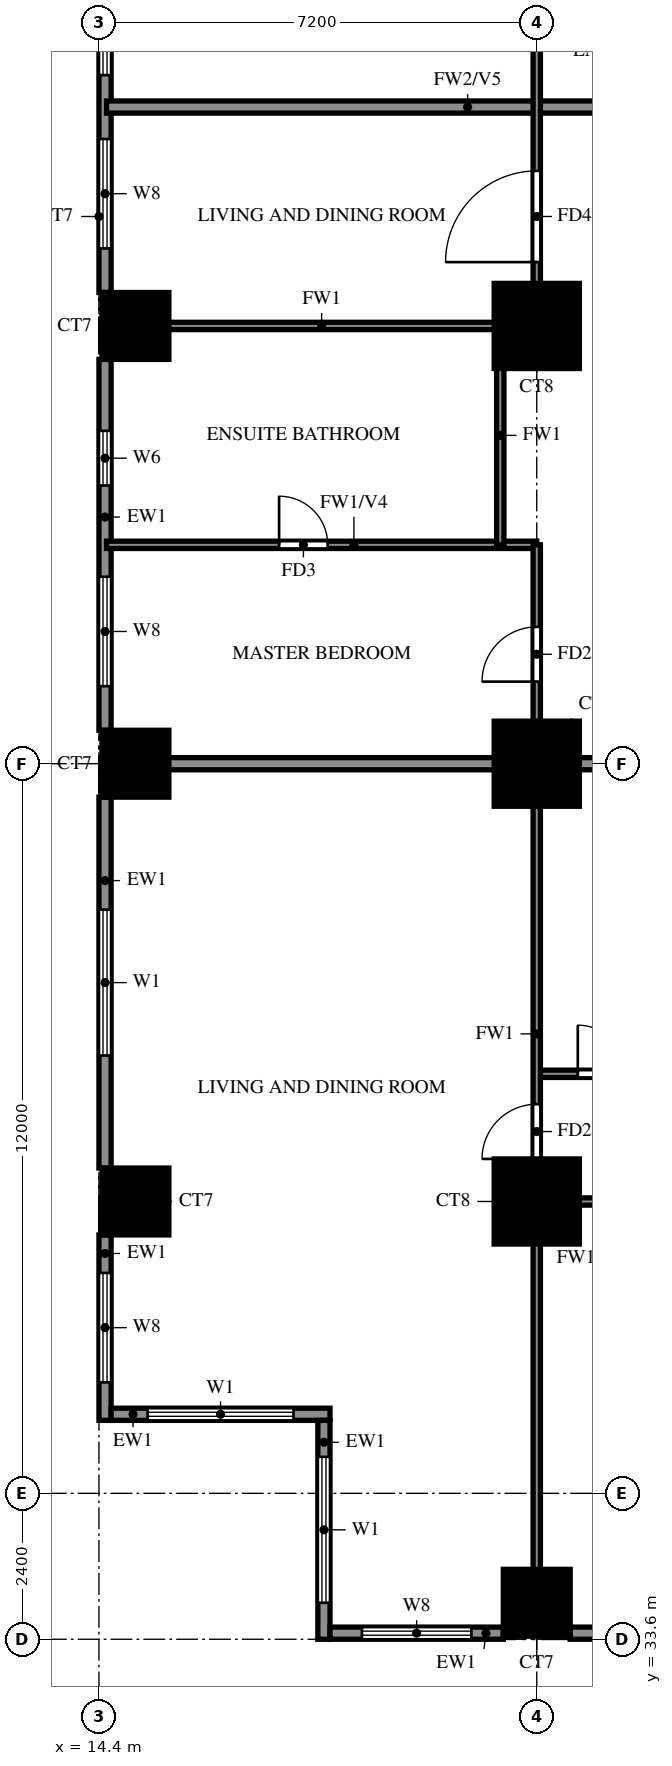
"""IFC4 building model, lengths in metres.
Left out: names, types, materials, properties, quantities, classifications, styles, units other than length and angle.
Written with IfcOpenShell. Run it as: python <this file> out.ifc"""

import sys

from ifc_helpers import new_model, si_unit, direction, frame, frame_2d, origin, origin_2d, place, context, subcontext, project, spatial, rectangle, extrude, source, transform, mapped, element, fill, save


model = new_model("IFC4")
c1 = context("Model", 3, precision=1e-05, world=origin(), true_north=direction((0.0, 1.0)))
c2 = subcontext(c1, "Body", "Model", "MODEL_VIEW")
j1 = project(units=[si_unit("LENGTHUNIT", "METRE"), si_unit("PLANEANGLEUNIT", "RADIAN")], contexts=[c1])
p1 = place(None, origin())
s1 = spatial("IfcSite", under=j1, at=p1, CompositionType="ELEMENT")
p2 = place(p1, origin())
s2 = spatial("IfcBuilding", under=s1, at=p2, CompositionType="ELEMENT")
p3 = place(p2, frame((0.0, 0.0, 55.0)))
s3 = spatial("IfcBuildingStorey", under=s2, at=p3, CompositionType="ELEMENT", Elevation=55.0)
m1 = source(origin(), c2, "Body", "SweptSolid", [
    extrude(rectangle(XDim=1.1, YDim=1.1, at=origin_2d()), origin(), (0.0, 0.0, 1.0), 3.18),
])
for number, where, z_axis, x_axis in (
    (1, (21.6, 34.2, 0.0), (0.0, 0.0, 1.0), (1.0, 0.0, 0.0)),
    (2, (15.0, 40.8, 0.0), (0.0, 0.0, 1.0), (1.0, 0.0, 0.0)),
):
    element("IfcColumn", number, at=place(p3, frame(where, z_axis=z_axis, x_axis=x_axis)), inside=s3, PredefinedType="COLUMN", context=c2, shape_type="MappedRepresentation", body=[
        mapped(m1, transform((0.0, 0.0, 0.0))),
    ])
m2 = source(origin(), c2, "Body", "SweptSolid", [
    extrude(rectangle(XDim=1.4, YDim=1.4, at=origin_2d()), origin(), (0.0, 0.0, 1.0), 3.18),
])
p4 = place(p3, frame((21.6, 40.8, 0.0), z_axis=(0.0, 0.0, 1.0), x_axis=(1.0, 0.0, 0.0)))
e3 = element("IfcColumn", 3, at=p4, inside=s3, PredefinedType="COLUMN", context=c2, shape_type="MappedRepresentation", body=[
    mapped(m2, transform((0.0, 0.0, 0.0))),
])
p5 = place(p3, frame((15.0, 48.0, 0.0), z_axis=(0.0, 0.0, 1.0), x_axis=(1.0, 0.0, 0.0)))
e4 = element("IfcColumn", 4, at=p5, inside=s3, PredefinedType="COLUMN", context=c2, shape_type="MappedRepresentation", body=[
    mapped(m1, transform((0.0, 0.0, 0.0))),
])
p6 = place(p3, frame((21.6, 48.0, 0.0), z_axis=(0.0, 0.0, 1.0), x_axis=(1.0, 0.0, 0.0)))
e5 = element("IfcColumn", 5, at=p6, inside=s3, PredefinedType="COLUMN", context=c2, shape_type="MappedRepresentation", body=[
    mapped(m2, transform((0.0, 0.0, 0.0))),
])
p7 = place(p3, frame((15.0, 55.2, 0.0), z_axis=(0.0, 0.0, 1.0), x_axis=(1.0, 0.0, 0.0)))
e6 = element("IfcColumn", 6, at=p7, inside=s3, PredefinedType="COLUMN", context=c2, shape_type="MappedRepresentation", body=[
    mapped(m1, transform((0.0, 0.0, 0.0))),
])
p8 = place(p3, frame((21.6, 55.2, 0.0), z_axis=(0.0, 0.0, 1.0), x_axis=(1.0, 0.0, 0.0)))
e7 = element("IfcColumn", 7, at=p8, inside=s3, PredefinedType="COLUMN", context=c2, shape_type="MappedRepresentation", body=[
    mapped(m2, transform((0.0, 0.0, 0.0))),
])
p9 = place(p3, frame((14.5, 61.85, 0.0), z_axis=(0.0, 0.0, 1.0), x_axis=(0.0, -1.0, 0.0)))
e8 = element("IfcWall", 8, at=p9, inside=s3, PredefinedType="SOLIDWALL", context=c2, shape_type="SweptSolid", body=[
    extrude(rectangle(XDim=6.1, YDim=0.2, at=frame_2d((3.05, 0.0))), origin(), (0.0, 0.0, 1.0), 3.18),
])
p10 = place(p9, frame((3.575, 0.0, 0.6)))
e9 = element("IfcOpeningElement", 9, at=p10, cuts=e8, PredefinedType="OPENING", context=c2, shape_type="SweptSolid", body=[
    extrude(rectangle(XDim=1.8, YDim=2.4, at=frame_2d((0.9, 1.2))), frame((0.0, 0.11, 0.0), z_axis=(0.0, -1.0, 0.0), x_axis=(1.0, 0.0, 0.0)), (0.0, 0.0, 1.0), 0.22),
])
p11 = place(p9, frame((0.725, 0.0, 0.6)))
e10 = element("IfcOpeningElement", 10, at=p11, cuts=e8, PredefinedType="OPENING", context=c2, shape_type="SweptSolid", body=[
    extrude(rectangle(XDim=1.8, YDim=2.4, at=frame_2d((0.9, 1.2))), frame((0.0, 0.11, 0.0), z_axis=(0.0, -1.0, 0.0), x_axis=(1.0, 0.0, 0.0)), (0.0, 0.0, 1.0), 0.22),
])
p12 = place(p3, frame((14.5, 54.65, 0.0), z_axis=(0.0, 0.0, 1.0), x_axis=(0.0, -1.0, 0.0)))
e11 = element("IfcWall", 11, at=p12, inside=s3, PredefinedType="SOLIDWALL", context=c2, shape_type="SweptSolid", body=[
    extrude(rectangle(XDim=6.1, YDim=0.2, at=frame_2d((3.05, 0.0))), origin(), (0.0, 0.0, 1.0), 3.18),
])
p13 = place(p12, frame((3.575, 0.0, 0.6)))
e12 = element("IfcOpeningElement", 12, at=p13, cuts=e11, PredefinedType="OPENING", context=c2, shape_type="SweptSolid", body=[
    extrude(rectangle(XDim=1.8, YDim=2.4, at=frame_2d((0.9, 1.2))), frame((0.0, 0.11, 0.0), z_axis=(0.0, -1.0, 0.0), x_axis=(1.0, 0.0, 0.0)), (0.0, 0.0, 1.0), 0.22),
])
p14 = place(p12, frame((1.175, 0.0, 1.5)))
e13 = element("IfcOpeningElement", 13, at=p14, cuts=e11, PredefinedType="OPENING", context=c2, shape_type="SweptSolid", body=[
    extrude(rectangle(XDim=0.9, YDim=0.9, at=frame_2d((0.45, 0.45))), frame((0.0, 0.11, 0.0), z_axis=(0.0, -1.0, 0.0), x_axis=(1.0, 0.0, 0.0)), (0.0, 0.0, 1.0), 0.22),
])
p15 = place(p3, frame((14.5, 47.45, 0.0), z_axis=(0.0, 0.0, 1.0), x_axis=(0.0, -1.0, 0.0)))
e14 = element("IfcWall", 14, at=p15, inside=s3, PredefinedType="SOLIDWALL", context=c2, shape_type="SweptSolid", body=[
    extrude(rectangle(XDim=6.1, YDim=0.2, at=frame_2d((3.05, 0.0))), origin(), (0.0, 0.0, 1.0), 3.18),
])
p16 = place(p15, frame((1.85, 0.0, 0.6)))
e15 = element("IfcOpeningElement", 15, at=p16, cuts=e14, PredefinedType="OPENING", context=c2, shape_type="SweptSolid", body=[
    extrude(rectangle(XDim=2.4, YDim=2.4, at=frame_2d((1.2, 1.2))), frame((0.0, 0.11, 0.0), z_axis=(0.0, -1.0, 0.0), x_axis=(1.0, 0.0, 0.0)), (0.0, 0.0, 1.0), 0.22),
])
p17 = place(p3, frame((14.5, 40.25, 0.0), z_axis=(0.0, 0.0, 1.0), x_axis=(0.0, -1.0, 0.0)))
e16 = element("IfcWall", 16, at=p17, inside=s3, PredefinedType="SOLIDWALL", context=c2, shape_type="SweptSolid", body=[
    extrude(rectangle(XDim=3.05, YDim=0.2, at=frame_2d((1.525, 0.0))), origin(), (0.0, 0.0, 1.0), 3.18),
])
p18 = place(p17, frame((0.625, 0.0, 0.6)))
e17 = element("IfcOpeningElement", 17, at=p18, cuts=e16, PredefinedType="OPENING", context=c2, shape_type="SweptSolid", body=[
    extrude(rectangle(XDim=1.8, YDim=2.4, at=frame_2d((0.9, 1.2))), frame((0.0, 0.11, 0.0), z_axis=(0.0, -1.0, 0.0), x_axis=(1.0, 0.0, 0.0)), (0.0, 0.0, 1.0), 0.22),
])
p19 = place(p3, frame((14.6, 37.3, 0.0), z_axis=(0.0, 0.0, 1.0), x_axis=(1.0, 0.0, 0.0)))
e18 = element("IfcWall", 18, at=p19, inside=s3, PredefinedType="SOLIDWALL", context=c2, shape_type="SweptSolid", body=[
    extrude(rectangle(XDim=3.6, YDim=0.2, at=frame_2d((1.8, 0.0))), origin(), (0.0, 0.0, 1.0), 3.18),
])
p20 = place(p19, frame((0.6, 0.0, 0.6)))
e19 = element("IfcOpeningElement", 19, at=p20, cuts=e18, PredefinedType="OPENING", context=c2, shape_type="SweptSolid", body=[
    extrude(rectangle(XDim=2.4, YDim=2.4, at=frame_2d((1.2, 1.2))), frame((0.0, 0.11, 0.0), z_axis=(0.0, -1.0, 0.0), x_axis=(1.0, 0.0, 0.0)), (0.0, 0.0, 1.0), 0.22),
])
p21 = place(p3, frame((18.1, 37.2, 0.0), z_axis=(0.0, 0.0, 1.0), x_axis=(0.0, -1.0, 0.0)))
e20 = element("IfcWall", 20, at=p21, inside=s3, PredefinedType="SOLIDWALL", context=c2, shape_type="SweptSolid", body=[
    extrude(rectangle(XDim=3.6, YDim=0.2, at=frame_2d((1.8, 0.0))), origin(), (0.0, 0.0, 1.0), 3.18),
])
p22 = place(p21, frame((0.6, 0.0, 0.6)))
e21 = element("IfcOpeningElement", 21, at=p22, cuts=e20, PredefinedType="OPENING", context=c2, shape_type="SweptSolid", body=[
    extrude(rectangle(XDim=2.4, YDim=2.4, at=frame_2d((1.2, 1.2))), frame((0.0, 0.11, 0.0), z_axis=(0.0, -1.0, 0.0), x_axis=(1.0, 0.0, 0.0)), (0.0, 0.0, 1.0), 0.22),
])
p23 = place(p3, frame((18.2, 33.7, 0.0), z_axis=(0.0, 0.0, 1.0), x_axis=(1.0, 0.0, 0.0)))
e22 = element("IfcWall", 22, at=p23, inside=s3, PredefinedType="SOLIDWALL", context=c2, shape_type="SweptSolid", body=[
    extrude(rectangle(XDim=2.85, YDim=0.2, at=frame_2d((1.425, 0.0))), origin(), (0.0, 0.0, 1.0), 3.18),
])
p24 = place(p23, frame((0.525, 0.0, 0.6)))
e23 = element("IfcOpeningElement", 23, at=p24, cuts=e22, PredefinedType="OPENING", context=c2, shape_type="SweptSolid", body=[
    extrude(rectangle(XDim=1.8, YDim=2.4, at=frame_2d((0.9, 1.2))), frame((0.0, 0.11, 0.0), z_axis=(0.0, -1.0, 0.0), x_axis=(1.0, 0.0, 0.0)), (0.0, 0.0, 1.0), 0.22),
])
p25 = place(p3, frame((22.15, 33.7, 0.0), z_axis=(0.0, 0.0, 1.0), x_axis=(1.0, 0.0, 0.0)))
e24 = element("IfcWall", 24, at=p25, inside=s3, PredefinedType="SOLIDWALL", context=c2, shape_type="SweptSolid", body=[
    extrude(rectangle(XDim=6.1, YDim=0.2, at=frame_2d((3.05, 0.0))), origin(), (0.0, 0.0, 1.0), 3.18),
])
p26 = place(p25, frame((0.725, 0.0, 0.6)))
e25 = element("IfcOpeningElement", 25, at=p26, cuts=e24, PredefinedType="OPENING", context=c2, shape_type="SweptSolid", body=[
    extrude(rectangle(XDim=1.8, YDim=2.4, at=frame_2d((0.9, 1.2))), frame((0.0, 0.11, 0.0), z_axis=(0.0, -1.0, 0.0), x_axis=(1.0, 0.0, 0.0)), (0.0, 0.0, 1.0), 0.22),
])
p27 = place(p25, frame((4.025, 0.0, 1.5)))
e26 = element("IfcOpeningElement", 26, at=p27, cuts=e24, PredefinedType="OPENING", context=c2, shape_type="SweptSolid", body=[
    extrude(rectangle(XDim=0.9, YDim=0.9, at=frame_2d((0.45, 0.45))), frame((0.0, 0.11, 0.0), z_axis=(0.0, -1.0, 0.0), x_axis=(1.0, 0.0, 0.0)), (0.0, 0.0, 1.0), 0.22),
])
p28 = place(p3, frame((14.525, 48.0, 0.0), z_axis=(0.0, 0.0, 1.0), x_axis=(1.0, 0.0, 0.0)))
e27 = element("IfcWall", 27, at=p28, inside=s3, PredefinedType="SOLIDWALL", context=c2, shape_type="SweptSolid", body=[
    extrude(rectangle(XDim=19.075, YDim=0.2, at=frame_2d((9.538, 0.0))), origin(), (0.0, 0.0, 1.0), 3.18),
])
p29 = place(p3, frame((14.525, 58.8, 0.0), z_axis=(0.0, 0.0, 1.0), x_axis=(1.0, 0.0, 0.0)))
e28 = element("IfcWall", 28, at=p29, inside=s3, PredefinedType="SOLIDWALL", context=c2, shape_type="SweptSolid", body=[
    extrude(rectangle(XDim=11.875, YDim=0.2, at=frame_2d((5.938, 0.0))), origin(), (0.0, 0.0, 1.0), 2.28),
])
p30 = place(p3, frame((21.6, 40.8, 0.0), z_axis=(0.0, 0.0, 1.0), x_axis=(1.0, 0.0, 0.0)))
e29 = element("IfcWall", 29, at=p30, inside=s3, PredefinedType="PARTITIONING", context=c2, shape_type="SweptSolid", body=[
    extrude(rectangle(XDim=3.6, YDim=0.12, at=frame_2d((1.8, 0.0))), origin(), (0.0, 0.0, 1.0), 3.18),
])
p31 = place(p30, frame((1.35, 0.0, 0.0)))
e30 = element("IfcOpeningElement", 30, at=p31, cuts=e29, PredefinedType="OPENING", context=c2, shape_type="SweptSolid", body=[
    extrude(rectangle(XDim=0.9, YDim=2.1, at=frame_2d((0.45, 1.05))), frame((0.0, 0.07, 0.0), z_axis=(0.0, -1.0, 0.0), x_axis=(1.0, 0.0, 0.0)), (0.0, 0.0, 1.0), 0.14),
])
p32 = place(p3, frame((21.6, 42.9, 0.0), z_axis=(0.0, 0.0, 1.0), x_axis=(1.0, 0.0, 0.0)))
e31 = element("IfcWall", 31, at=p32, inside=s3, PredefinedType="PARTITIONING", context=c2, shape_type="SweptSolid", body=[
    extrude(rectangle(XDim=12.0, YDim=0.12, at=frame_2d((6.0, 0.0))), origin(), (0.0, 0.0, 1.0), 3.18),
])
p33 = place(p32, frame((0.675, 0.0, 0.0)))
e32 = element("IfcOpeningElement", 32, at=p33, cuts=e31, PredefinedType="OPENING", context=c2, shape_type="SweptSolid", body=[
    extrude(rectangle(XDim=0.8, YDim=2.1, at=frame_2d((0.4, 1.05))), frame((0.0, 0.07, 0.0), z_axis=(0.0, -1.0, 0.0), x_axis=(1.0, 0.0, 0.0)), (0.0, 0.0, 1.0), 0.14),
])
p34 = place(p32, frame((4.0, 0.0, 0.0)))
e33 = element("IfcOpeningElement", 33, at=p34, cuts=e31, PredefinedType="OPENING", context=c2, shape_type="SweptSolid", body=[
    extrude(rectangle(XDim=0.9, YDim=2.1, at=frame_2d((0.45, 1.05))), frame((0.0, 0.07, 0.0), z_axis=(0.0, -1.0, 0.0), x_axis=(1.0, 0.0, 0.0)), (0.0, 0.0, 1.0), 0.14),
])
p35 = place(p32, frame((7.475, 0.0, 0.0)))
e34 = element("IfcOpeningElement", 34, at=p35, cuts=e31, PredefinedType="OPENING", context=c2, shape_type="SweptSolid", body=[
    extrude(rectangle(XDim=0.9, YDim=2.1, at=frame_2d((0.45, 1.05))), frame((0.0, 0.07, 0.0), z_axis=(0.0, -1.0, 0.0), x_axis=(1.0, 0.0, 0.0)), (0.0, 0.0, 1.0), 0.14),
])
p36 = place(p32, frame((10.1, 0.0, 0.0)))
e35 = element("IfcOpeningElement", 35, at=p36, cuts=e31, PredefinedType="OPENING", context=c2, shape_type="SweptSolid", body=[
    extrude(rectangle(XDim=0.9, YDim=2.1, at=frame_2d((0.45, 1.05))), frame((0.0, 0.07, 0.0), z_axis=(0.0, -1.0, 0.0), x_axis=(1.0, 0.0, 0.0)), (0.0, 0.0, 1.0), 0.14),
])
p37 = place(p3, frame((14.525, 51.6, 0.0), z_axis=(0.0, 0.0, 1.0), x_axis=(1.0, 0.0, 0.0)))
e36 = element("IfcWall", 36, at=p37, inside=s3, PredefinedType="PARTITIONING", context=c2, shape_type="SweptSolid", body=[
    extrude(rectangle(XDim=7.075, YDim=0.12, at=frame_2d((3.538, 0.0))), origin(), (0.0, 0.0, 1.0), 2.28),
])
p38 = place(p37, frame((2.837, 0.0, 0.0)))
e37 = element("IfcOpeningElement", 37, at=p38, cuts=e36, PredefinedType="OPENING", context=c2, shape_type="SweptSolid", body=[
    extrude(rectangle(XDim=0.8, YDim=2.1, at=frame_2d((0.4, 1.05))), frame((0.0, 0.07, 0.0), z_axis=(0.0, -1.0, 0.0), x_axis=(1.0, 0.0, 0.0)), (0.0, 0.0, 1.0), 0.14),
])
p39 = place(p3, frame((14.525, 55.2, 0.0), z_axis=(0.0, 0.0, 1.0), x_axis=(1.0, 0.0, 0.0)))
e38 = element("IfcWall", 38, at=p39, inside=s3, PredefinedType="PARTITIONING", context=c2, shape_type="SweptSolid", body=[
    extrude(rectangle(XDim=7.075, YDim=0.12, at=frame_2d((3.538, 0.0))), origin(), (0.0, 0.0, 1.0), 3.18),
])
p40 = place(p3, frame((21.0, 51.6, 0.0), z_axis=(0.0, 0.0, 1.0), x_axis=(0.0, 1.0, 0.0)))
e39 = element("IfcWall", 39, at=p40, inside=s3, PredefinedType="PARTITIONING", context=c2, shape_type="SweptSolid", body=[
    extrude(rectangle(XDim=3.6, YDim=0.12, at=frame_2d((1.8, 0.0))), origin(), (0.0, 0.0, 1.0), 3.18),
])
p41 = place(p3, frame((21.6, 33.725, 0.0), z_axis=(0.0, 0.0, 1.0), x_axis=(0.0, 1.0, 0.0)))
e40 = element("IfcWall", 40, at=p41, inside=s3, PredefinedType="PARTITIONING", context=c2, shape_type="SweptSolid", body=[
    extrude(rectangle(XDim=17.875, YDim=0.12, at=frame_2d((8.938, 0.0))), origin(), (0.0, 0.0, 1.0), 3.18),
])
p42 = place(p41, frame((7.775, 0.0, 0.0)))
e41 = element("IfcOpeningElement", 41, at=p42, cuts=e40, PredefinedType="OPENING", context=c2, shape_type="SweptSolid", body=[
    extrude(rectangle(XDim=0.9, YDim=2.1, at=frame_2d((0.45, 1.05))), frame((0.0, 0.07, 0.0), z_axis=(0.0, -1.0, 0.0), x_axis=(1.0, 0.0, 0.0)), (0.0, 0.0, 1.0), 0.14),
])
p43 = place(p41, frame((15.625, 0.0, 0.0)))
e42 = element("IfcOpeningElement", 42, at=p43, cuts=e40, PredefinedType="OPENING", context=c2, shape_type="SweptSolid", body=[
    extrude(rectangle(XDim=0.9, YDim=2.1, at=frame_2d((0.45, 1.05))), frame((0.0, 0.07, 0.0), z_axis=(0.0, -1.0, 0.0), x_axis=(1.0, 0.0, 0.0)), (0.0, 0.0, 1.0), 0.14),
])
p44 = place(p3, frame((21.6, 55.2, 0.0), z_axis=(0.0, 0.0, 1.0), x_axis=(0.0, 1.0, 0.0)))
e43 = element("IfcWall", 43, at=p44, inside=s3, PredefinedType="PARTITIONING", context=c2, shape_type="SweptSolid", body=[
    extrude(rectangle(XDim=14.4, YDim=0.12, at=frame_2d((7.2, 0.0))), origin(), (0.0, 0.0, 1.0), 3.18),
])
p45 = place(p44, frame((1.05, 0.0, 0.0)))
e44 = element("IfcOpeningElement", 44, at=p45, cuts=e43, PredefinedType="OPENING", context=c2, shape_type="SweptSolid", body=[
    extrude(rectangle(XDim=1.5, YDim=2.1, at=frame_2d((0.75, 1.05))), frame((0.0, 0.07, 0.0), z_axis=(0.0, -1.0, 0.0), x_axis=(1.0, 0.0, 0.0)), (0.0, 0.0, 1.0), 0.14),
])
p46 = place(p44, frame((4.95, 0.0, 0.0)))
e45 = element("IfcOpeningElement", 45, at=p46, cuts=e43, PredefinedType="OPENING", context=c2, shape_type="SweptSolid", body=[
    extrude(rectangle(XDim=0.9, YDim=2.1, at=frame_2d((0.45, 1.05))), frame((0.0, 0.07, 0.0), z_axis=(0.0, -1.0, 0.0), x_axis=(1.0, 0.0, 0.0)), (0.0, 0.0, 1.0), 0.14),
])
p47 = place(p44, frame((10.35, 0.0, 0.0)))
e46 = element("IfcOpeningElement", 46, at=p47, cuts=e43, PredefinedType="OPENING", context=c2, shape_type="SweptSolid", body=[
    extrude(rectangle(XDim=0.9, YDim=2.1, at=frame_2d((0.45, 1.05))), frame((0.0, 0.07, 0.0), z_axis=(0.0, -1.0, 0.0), x_axis=(1.0, 0.0, 0.0)), (0.0, 0.0, 1.0), 0.14),
])
p48 = place(p10, origin())
e47 = element("IfcWindow", 47, at=p48, inside=s3, PartitioningType="DOUBLE_PANEL_VERTICAL", PredefinedType="WINDOW", context=c2, shape_type="SweptSolid", body=[
    extrude(rectangle(XDim=1.8, YDim=2.4, at=frame_2d((0.9, 1.2))), frame((0.0, 0.03, 0.0), z_axis=(0.0, -1.0, 0.0), x_axis=(1.0, 0.0, 0.0)), (0.0, 0.0, 1.0), 0.06),
])
fill(e9, e47)
p49 = place(p11, origin())
e48 = element("IfcWindow", 48, at=p49, inside=s3, PartitioningType="DOUBLE_PANEL_VERTICAL", PredefinedType="WINDOW", context=c2, shape_type="SweptSolid", body=[
    extrude(rectangle(XDim=1.8, YDim=2.4, at=frame_2d((0.9, 1.2))), frame((0.0, 0.03, 0.0), z_axis=(0.0, -1.0, 0.0), x_axis=(1.0, 0.0, 0.0)), (0.0, 0.0, 1.0), 0.06),
])
fill(e10, e48)
p50 = place(p13, origin())
e49 = element("IfcWindow", 49, at=p50, inside=s3, PartitioningType="DOUBLE_PANEL_VERTICAL", PredefinedType="WINDOW", context=c2, shape_type="SweptSolid", body=[
    extrude(rectangle(XDim=1.8, YDim=2.4, at=frame_2d((0.9, 1.2))), frame((0.0, 0.03, 0.0), z_axis=(0.0, -1.0, 0.0), x_axis=(1.0, 0.0, 0.0)), (0.0, 0.0, 1.0), 0.06),
])
fill(e12, e49)
p51 = place(p14, origin())
e50 = element("IfcWindow", 50, at=p51, inside=s3, PartitioningType="SINGLE_PANEL", PredefinedType="WINDOW", context=c2, shape_type="SweptSolid", body=[
    extrude(rectangle(XDim=0.9, YDim=0.9, at=frame_2d((0.45, 0.45))), frame((0.0, 0.03, 0.0), z_axis=(0.0, -1.0, 0.0), x_axis=(1.0, 0.0, 0.0)), (0.0, 0.0, 1.0), 0.06),
])
fill(e13, e50)
p52 = place(p16, origin())
e51 = element("IfcWindow", 51, at=p52, inside=s3, PartitioningType="DOUBLE_PANEL_VERTICAL", PredefinedType="WINDOW", context=c2, shape_type="SweptSolid", body=[
    extrude(rectangle(XDim=2.4, YDim=2.4, at=frame_2d((1.2, 1.2))), frame((0.0, 0.03, 0.0), z_axis=(0.0, -1.0, 0.0), x_axis=(1.0, 0.0, 0.0)), (0.0, 0.0, 1.0), 0.06),
])
fill(e15, e51)
p53 = place(p18, origin())
e52 = element("IfcWindow", 52, at=p53, inside=s3, PartitioningType="DOUBLE_PANEL_VERTICAL", PredefinedType="WINDOW", context=c2, shape_type="SweptSolid", body=[
    extrude(rectangle(XDim=1.8, YDim=2.4, at=frame_2d((0.9, 1.2))), frame((0.0, 0.03, 0.0), z_axis=(0.0, -1.0, 0.0), x_axis=(1.0, 0.0, 0.0)), (0.0, 0.0, 1.0), 0.06),
])
fill(e17, e52)
p54 = place(p20, origin())
e53 = element("IfcWindow", 53, at=p54, inside=s3, PartitioningType="DOUBLE_PANEL_VERTICAL", PredefinedType="WINDOW", context=c2, shape_type="SweptSolid", body=[
    extrude(rectangle(XDim=2.4, YDim=2.4, at=frame_2d((1.2, 1.2))), frame((0.0, 0.03, 0.0), z_axis=(0.0, -1.0, 0.0), x_axis=(1.0, 0.0, 0.0)), (0.0, 0.0, 1.0), 0.06),
])
fill(e19, e53)
p55 = place(p22, origin())
e54 = element("IfcWindow", 54, at=p55, inside=s3, PartitioningType="DOUBLE_PANEL_VERTICAL", PredefinedType="WINDOW", context=c2, shape_type="SweptSolid", body=[
    extrude(rectangle(XDim=2.4, YDim=2.4, at=frame_2d((1.2, 1.2))), frame((0.0, 0.03, 0.0), z_axis=(0.0, -1.0, 0.0), x_axis=(1.0, 0.0, 0.0)), (0.0, 0.0, 1.0), 0.06),
])
fill(e21, e54)
p56 = place(p24, origin())
e55 = element("IfcWindow", 55, at=p56, inside=s3, PartitioningType="DOUBLE_PANEL_VERTICAL", PredefinedType="WINDOW", context=c2, shape_type="SweptSolid", body=[
    extrude(rectangle(XDim=1.8, YDim=2.4, at=frame_2d((0.9, 1.2))), frame((0.0, 0.03, 0.0), z_axis=(0.0, -1.0, 0.0), x_axis=(1.0, 0.0, 0.0)), (0.0, 0.0, 1.0), 0.06),
])
fill(e23, e55)
p57 = place(p42, origin())
e56 = element("IfcDoor", 56, at=p57, inside=s3, OperationType="SINGLE_SWING_RIGHT", PredefinedType="DOOR", context=c2, shape_type="SweptSolid", body=[
    extrude(rectangle(XDim=0.9, YDim=2.1, at=frame_2d((0.45, 1.05))), frame((0.0, 0.025, 0.0), z_axis=(0.0, -1.0, 0.0), x_axis=(1.0, 0.0, 0.0)), (0.0, 0.0, 1.0), 0.05),
])
fill(e41, e56)
p58 = place(p33, origin())
e57 = element("IfcDoor", 57, at=p58, inside=s3, OperationType="SINGLE_SWING_LEFT", PredefinedType="DOOR", context=c2, shape_type="SweptSolid", body=[
    extrude(rectangle(XDim=0.8, YDim=2.1, at=frame_2d((0.4, 1.05))), frame((0.0, 0.025, 0.0), z_axis=(0.0, -1.0, 0.0), x_axis=(1.0, 0.0, 0.0)), (0.0, 0.0, 1.0), 0.05),
])
fill(e32, e57)
p59 = place(p43, origin())
e58 = element("IfcDoor", 58, at=p59, inside=s3, OperationType="SINGLE_SWING_RIGHT", PredefinedType="DOOR", context=c2, shape_type="SweptSolid", body=[
    extrude(rectangle(XDim=0.9, YDim=2.1, at=frame_2d((0.45, 1.05))), frame((0.0, 0.025, 0.0), z_axis=(0.0, -1.0, 0.0), x_axis=(1.0, 0.0, 0.0)), (0.0, 0.0, 1.0), 0.05),
])
fill(e42, e58)
p60 = place(p38, origin())
e59 = element("IfcDoor", 59, at=p60, inside=s3, OperationType="SINGLE_SWING_LEFT", PredefinedType="DOOR", context=c2, shape_type="SweptSolid", body=[
    extrude(rectangle(XDim=0.8, YDim=2.1, at=frame_2d((0.4, 1.05))), frame((0.0, 0.025, 0.0), z_axis=(0.0, -1.0, 0.0), x_axis=(1.0, 0.0, 0.0)), (0.0, 0.0, 1.0), 0.05),
])
fill(e37, e59)
p61 = place(p45, origin())
e60 = element("IfcDoor", 60, at=p61, inside=s3, OperationType="SINGLE_SWING_LEFT", PredefinedType="DOOR", context=c2, shape_type="SweptSolid", body=[
    extrude(rectangle(XDim=1.5, YDim=2.1, at=frame_2d((0.75, 1.05))), frame((0.0, 0.025, 0.0), z_axis=(0.0, -1.0, 0.0), x_axis=(1.0, 0.0, 0.0)), (0.0, 0.0, 1.0), 0.05),
])
fill(e44, e60)
save(model, sys.argv[1])
